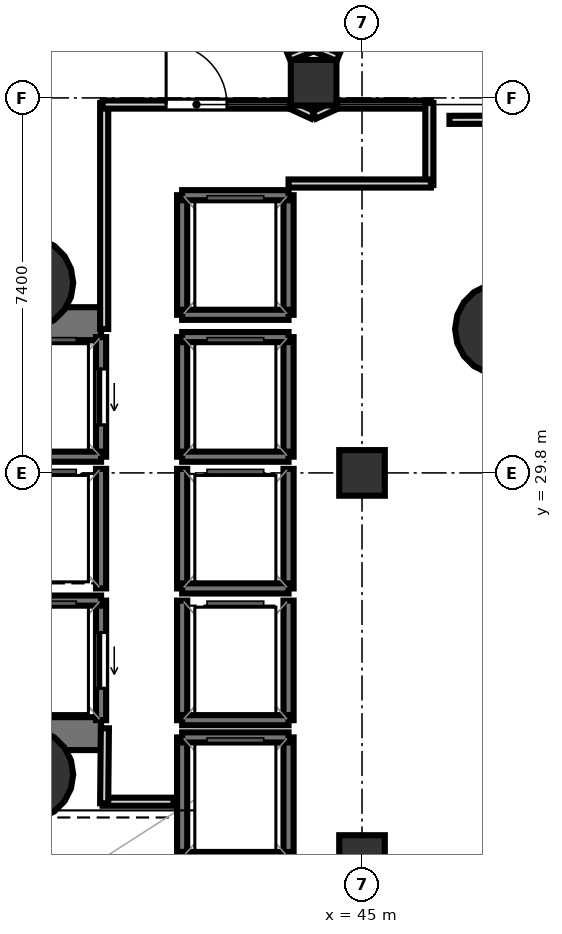
"""IFC4 building model, lengths in metres.
Left out: names, types, materials, properties, quantities, classifications, styles, units other than length and angle.
Written with IfcOpenShell. Run it as: python <this file> out.ifc"""

import sys

from ifc_helpers import new_model, si_unit, direction, frame, frame_2d, origin, origin_2d, place, context, subcontext, project, spatial, rectangle, hollow_circle, extrude, element, fill, save


model = new_model("IFC4")
c1 = context("Model", 3, precision=1e-05, world=origin(), true_north=direction((0.0, 1.0)))
c2 = subcontext(c1, "Body", "Model", "MODEL_VIEW")
j1 = project(units=[si_unit("LENGTHUNIT", "METRE"), si_unit("PLANEANGLEUNIT", "RADIAN")], contexts=[c1])
p1 = place(None, origin())
s1 = spatial("IfcSite", under=j1, at=p1, CompositionType="ELEMENT")
p2 = place(p1, origin())
s2 = spatial("IfcBuilding", under=s1, at=p2, CompositionType="ELEMENT")
p3 = place(p2, frame((0.0, 0.0, 20.6)))
s3 = spatial("IfcBuildingStorey", under=s2, at=p3, CompositionType="ELEMENT", Elevation=20.6)
p4 = place(p3, frame((29.13, 32.745, 0.0), z_axis=(0.0, 0.0, 1.0), x_axis=(1.0, 0.0, 0.0)))
e1 = element("IfcWall", 1, at=p4, inside=s3, PredefinedType="SHEAR", context=c2, shape_type="SweptSolid", body=[
    extrude(rectangle(XDim=10.72, YDim=0.65, at=frame_2d((5.36, 0.0))), origin(), (0.0, 0.0, 1.0), 4.88),
])
p5 = place(p4, frame((1.095, 0.0, 0.0)))
e2 = element("IfcOpeningElement", 2, at=p5, cuts=e1, PredefinedType="OPENING", context=c2, shape_type="SweptSolid", body=[
    extrude(rectangle(XDim=1.25, YDim=2.15, at=frame_2d((0.625, 1.075))), frame((0.0, 0.335, 0.0), z_axis=(0.0, -1.0, 0.0), x_axis=(1.0, 0.0, 0.0)), (0.0, 0.0, 1.0), 0.67),
])
p6 = place(p3, frame((29.13, 24.655, 0.0), z_axis=(0.0, 0.0, 1.0), x_axis=(1.0, 0.0, 0.0)))
e3 = element("IfcWall", 3, at=p6, inside=s3, PredefinedType="SHEAR", context=c2, shape_type="SweptSolid", body=[
    extrude(rectangle(XDim=10.72, YDim=0.65, at=frame_2d((5.36, 0.0))), origin(), (0.0, 0.0, 1.0), 4.88),
])
p7 = place(p6, frame((0.895, 0.0, 0.0)))
e4 = element("IfcOpeningElement", 4, at=p7, cuts=e3, PredefinedType="OPENING", context=c2, shape_type="SweptSolid", body=[
    extrude(rectangle(XDim=1.25, YDim=2.15, at=frame_2d((0.625, 1.075))), frame((0.0, 0.335, 0.0), z_axis=(0.0, -1.0, 0.0), x_axis=(1.0, 0.0, 0.0)), (0.0, 0.0, 1.0), 0.67),
])
for number, where, z_axis, x_axis in (
    (5, (38.4, 33.55, 0.0), (0.0, 0.0, 1.0), (1.0, 0.0, 0.0)),
    (6, (38.4, 23.85, 0.0), (0.0, 0.0, 1.0), (1.0, 0.0, 0.0)),
    (7, (47.736, 32.637, 0.0), (0.0, 0.0, 1.0), (1.0, 0.0, 0.0)),
):
    element("IfcColumn", number, at=place(p3, frame(where, z_axis=z_axis, x_axis=x_axis)), inside=s3, PredefinedType="COLUMN", context=c2, shape_type="SweptSolid", body=[
        extrude(hollow_circle(Radius=0.9, WallThickness=0.045, at=origin_2d()), origin(), (0.0, 0.0, 1.0), 5.1),
    ])
for number, where, z_axis, x_axis in (
    (8, (44.045, 37.5, 0.0), (0.0, 0.0, 1.0), (1.0, 0.0, 0.0)),
    (9, (45.0, 22.2, 0.0), (0.0, 0.0, 1.0), (1.0, 0.0, 0.0)),
    (10, (45.0, 29.8, 0.0), (0.0, 0.0, 1.0), (1.0, 0.0, 0.0)),
):
    element("IfcColumn", number, at=place(p3, frame(where, z_axis=z_axis, x_axis=x_axis)), inside=s3, PredefinedType="COLUMN", context=c2, shape_type="SweptSolid", body=[
        extrude(rectangle(XDim=0.9, YDim=0.9, at=origin_2d()), origin(), (0.0, 0.0, 1.0), 5.1),
    ])
p8 = place(p3, frame((39.85, 30.12, 0.0), z_axis=(0.0, 0.0, 1.0), x_axis=(0.0, 1.0, 0.0)))
e11 = element("IfcWall", 11, at=p8, inside=s3, PredefinedType="SOLIDWALL", context=c2, shape_type="SweptSolid", body=[
    extrude(rectangle(XDim=2.36, YDim=0.2, at=frame_2d((1.18, 0.0))), origin(), (0.0, 0.0, 1.0), 4.88),
])
p9 = place(p8, frame((0.63, 0.0, 0.0)))
e12 = element("IfcOpeningElement", 12, at=p9, cuts=e11, PredefinedType="OPENING", context=c2, shape_type="SweptSolid", body=[
    extrude(rectangle(XDim=1.1, YDim=2.15, at=frame_2d((0.55, 1.075))), frame((0.0, 0.11, 0.0), z_axis=(0.0, -1.0, 0.0), x_axis=(1.0, 0.0, 0.0)), (0.0, 0.0, 1.0), 0.22),
])
p10 = place(p3, frame((37.75, 30.12, 0.0), z_axis=(0.0, 0.0, 1.0), x_axis=(1.0, 0.0, 0.0)))
e13 = element("IfcWall", 13, at=p10, inside=s3, PredefinedType="SOLIDWALL", context=c2, shape_type="SweptSolid", body=[
    extrude(rectangle(XDim=2.1, YDim=0.2, at=frame_2d((1.05, 0.0))), origin(), (0.0, 0.0, 1.0), 4.88),
])
p11 = place(p3, frame((39.85, 24.92, 0.0), z_axis=(0.0, 0.0, 1.0), x_axis=(0.0, 1.0, 0.0)))
e14 = element("IfcWall", 14, at=p11, inside=s3, PredefinedType="SOLIDWALL", context=c2, shape_type="SweptSolid", body=[
    extrude(rectangle(XDim=2.36, YDim=0.2, at=frame_2d((1.18, 0.0))), origin(), (0.0, 0.0, 1.0), 4.88),
])
p12 = place(p11, frame((0.63, 0.0, 0.0)))
e15 = element("IfcOpeningElement", 15, at=p12, cuts=e14, PredefinedType="OPENING", context=c2, shape_type="SweptSolid", body=[
    extrude(rectangle(XDim=1.1, YDim=2.15, at=frame_2d((0.55, 1.075))), frame((0.0, 0.11, 0.0), z_axis=(0.0, -1.0, 0.0), x_axis=(1.0, 0.0, 0.0)), (0.0, 0.0, 1.0), 0.22),
])
p13 = place(p3, frame((37.75, 27.28, 0.0), z_axis=(0.0, 0.0, 1.0), x_axis=(1.0, 0.0, 0.0)))
e16 = element("IfcWall", 16, at=p13, inside=s3, PredefinedType="SOLIDWALL", context=c2, shape_type="SweptSolid", body=[
    extrude(rectangle(XDim=2.1, YDim=0.2, at=frame_2d((1.05, 0.0))), origin(), (0.0, 0.0, 1.0), 4.88),
])
for number, where, z_axis, x_axis in (
    (17, (43.55, 30.12, 0.0), (0.0, 0.0, 1.0), (0.0, 1.0, 0.0)),
    (18, (41.45, 30.12, 0.0), (0.0, 0.0, 1.0), (0.0, 1.0, 0.0)),
):
    element("IfcWall", number, at=place(p3, frame(where, z_axis=z_axis, x_axis=x_axis)), inside=s3, PredefinedType="SOLIDWALL", context=c2, shape_type="SweptSolid", body=[
        extrude(rectangle(XDim=2.36, YDim=0.2, at=frame_2d((1.18, 0.0))), origin(), (0.0, 0.0, 1.0), 4.88),
    ])
for number, where, z_axis, x_axis in (
    (19, (41.45, 32.48, 0.0), (0.0, 0.0, 1.0), (1.0, 0.0, 0.0)),
    (20, (41.45, 30.12, 0.0), (0.0, 0.0, 1.0), (1.0, 0.0, 0.0)),
):
    element("IfcWall", number, at=place(p3, frame(where, z_axis=z_axis, x_axis=x_axis)), inside=s3, PredefinedType="SOLIDWALL", context=c2, shape_type="SweptSolid", body=[
        extrude(rectangle(XDim=2.1, YDim=0.2, at=frame_2d((1.05, 0.0))), origin(), (0.0, 0.0, 1.0), 4.88),
    ])
for number, where, z_axis, x_axis in (
    (21, (43.55, 27.52, 0.0), (0.0, 0.0, 1.0), (0.0, 1.0, 0.0)),
    (22, (41.45, 27.52, 0.0), (0.0, 0.0, 1.0), (0.0, 1.0, 0.0)),
):
    element("IfcWall", number, at=place(p3, frame(where, z_axis=z_axis, x_axis=x_axis)), inside=s3, PredefinedType="SOLIDWALL", context=c2, shape_type="SweptSolid", body=[
        extrude(rectangle(XDim=2.36, YDim=0.2, at=frame_2d((1.18, 0.0))), origin(), (0.0, 0.0, 1.0), 4.88),
    ])
p14 = place(p3, frame((41.45, 27.52, 0.0), z_axis=(0.0, 0.0, 1.0), x_axis=(1.0, 0.0, 0.0)))
e23 = element("IfcWall", 23, at=p14, inside=s3, PredefinedType="SOLIDWALL", context=c2, shape_type="SweptSolid", body=[
    extrude(rectangle(XDim=2.1, YDim=0.2, at=frame_2d((1.05, 0.0))), origin(), (0.0, 0.0, 1.0), 4.88),
])
for number, where, z_axis, x_axis in (
    (24, (43.55, 24.92, 0.0), (0.0, 0.0, 1.0), (0.0, 1.0, 0.0)),
    (25, (41.45, 24.92, 0.0), (0.0, 0.0, 1.0), (0.0, 1.0, 0.0)),
):
    element("IfcWall", number, at=place(p3, frame(where, z_axis=z_axis, x_axis=x_axis)), inside=s3, PredefinedType="SOLIDWALL", context=c2, shape_type="SweptSolid", body=[
        extrude(rectangle(XDim=2.36, YDim=0.2, at=frame_2d((1.18, 0.0))), origin(), (0.0, 0.0, 1.0), 4.88),
    ])
p15 = place(p3, frame((41.45, 24.92, 0.0), z_axis=(0.0, 0.0, 1.0), x_axis=(1.0, 0.0, 0.0)))
e26 = element("IfcWall", 26, at=p15, inside=s3, PredefinedType="SOLIDWALL", context=c2, shape_type="SweptSolid", body=[
    extrude(rectangle(XDim=2.1, YDim=0.2, at=frame_2d((1.05, 0.0))), origin(), (0.0, 0.0, 1.0), 4.88),
])
p16 = place(p3, frame((39.85, 27.52, 0.0), z_axis=(0.0, 0.0, 1.0), x_axis=(0.0, 1.0, 0.0)))
e27 = element("IfcWall", 27, at=p16, inside=s3, PredefinedType="SOLIDWALL", context=c2, shape_type="SweptSolid", body=[
    extrude(rectangle(XDim=2.36, YDim=0.2, at=frame_2d((1.18, 0.0))), origin(), (0.0, 0.0, 1.0), 4.88),
])
for number, where, z_axis, x_axis in (
    (28, (43.55, 22.22, 0.0), (0.0, 0.0, 1.0), (0.0, 1.0, 0.0)),
    (29, (41.45, 22.22, 0.0), (0.0, 0.0, 1.0), (0.0, 1.0, 0.0)),
):
    element("IfcWall", number, at=place(p3, frame(where, z_axis=z_axis, x_axis=x_axis)), inside=s3, PredefinedType="SOLIDWALL", context=c2, shape_type="SweptSolid", body=[
        extrude(rectangle(XDim=2.36, YDim=0.2, at=frame_2d((1.18, 0.0))), origin(), (0.0, 0.0, 1.0), 4.88),
    ])
for number, where, z_axis, x_axis in (
    (30, (41.45, 24.58, 0.0), (0.0, 0.0, 1.0), (1.0, 0.0, 0.0)),
    (31, (41.45, 22.22, 0.0), (0.0, 0.0, 1.0), (1.0, 0.0, 0.0)),
):
    element("IfcWall", number, at=place(p3, frame(where, z_axis=z_axis, x_axis=x_axis)), inside=s3, PredefinedType="SOLIDWALL", context=c2, shape_type="SweptSolid", body=[
        extrude(rectangle(XDim=2.1, YDim=0.2, at=frame_2d((1.05, 0.0))), origin(), (0.0, 0.0, 1.0), 4.88),
    ])
for number, where, z_axis, x_axis in (
    (32, (43.55, 32.92, 0.0), (0.0, 0.0, 1.0), (0.0, 1.0, 0.0)),
    (33, (41.45, 32.92, 0.0), (0.0, 0.0, 1.0), (0.0, 1.0, 0.0)),
):
    element("IfcWall", number, at=place(p3, frame(where, z_axis=z_axis, x_axis=x_axis)), inside=s3, PredefinedType="SOLIDWALL", context=c2, shape_type="SweptSolid", body=[
        extrude(rectangle(XDim=2.36, YDim=0.2, at=frame_2d((1.18, 0.0))), origin(), (0.0, 0.0, 1.0), 4.88),
    ])
for number, where, z_axis, x_axis in (
    (34, (41.45, 35.28, 0.0), (0.0, 0.0, 1.0), (1.0, 0.0, 0.0)),
    (35, (41.45, 32.92, 0.0), (0.0, 0.0, 1.0), (1.0, 0.0, 0.0)),
):
    element("IfcWall", number, at=place(p3, frame(where, z_axis=z_axis, x_axis=x_axis)), inside=s3, PredefinedType="SOLIDWALL", context=c2, shape_type="SweptSolid", body=[
        extrude(rectangle(XDim=2.1, YDim=0.2, at=frame_2d((1.05, 0.0))), origin(), (0.0, 0.0, 1.0), 4.88),
    ])
p17 = place(p3, frame((39.911, 32.64, 0.0), z_axis=(0.0, 0.0, 1.0), x_axis=(0.0, 1.0, 0.0)))
e36 = element("IfcWall", 36, at=p17, inside=s3, PredefinedType="PARTITIONING", context=c2, shape_type="SweptSolid", body=[
    extrude(rectangle(XDim=4.46, YDim=0.16, at=frame_2d((2.23, 0.0))), origin(), (0.0, 0.0, 1.0), 3.4),
])
p18 = place(p3, frame((39.88, 37.069, 0.0), z_axis=(0.0, 0.0, 1.0), x_axis=(1.0, 0.0, 0.0)))
e37 = element("IfcWall", 37, at=p18, inside=s3, PredefinedType="PARTITIONING", context=c2, shape_type="SweptSolid", body=[
    extrude(rectangle(XDim=3.708, YDim=0.16, at=frame_2d((1.854, 0.0))), origin(), (0.0, 0.0, 1.0), 3.378),
])
p19 = place(p18, frame((1.254, 0.0, 0.0)))
e38 = element("IfcOpeningElement", 38, at=p19, cuts=e37, PredefinedType="OPENING", context=c2, shape_type="SweptSolid", body=[
    extrude(rectangle(XDim=1.2, YDim=2.15, at=frame_2d((0.6, 1.075))), frame((0.0, 0.09, 0.0), z_axis=(0.0, -1.0, 0.0), x_axis=(1.0, 0.0, 0.0)), (0.0, 0.0, 1.0), 0.18),
])
p20 = place(p3, frame((43.575, 37.072, 0.0), z_axis=(0.0, 0.0, 1.0), x_axis=(0.908696751383, -0.417456840913, 0.0)))
e39 = element("IfcWall", 39, at=p20, inside=s3, PredefinedType="PARTITIONING", context=c2, shape_type="SweptSolid", body=[
    extrude(rectangle(XDim=0.503, YDim=0.16, at=frame_2d((0.251, 0.0))), origin(), (0.0, 0.0, 1.0), 3.378),
])
p21 = place(p3, frame((44.058, 36.862, 0.0), z_axis=(0.0, 0.0, 1.0), x_axis=(0.908696751383, 0.417456840913, 0.0)))
e40 = element("IfcWall", 40, at=p21, inside=s3, PredefinedType="PARTITIONING", context=c2, shape_type="SweptSolid", body=[
    extrude(rectangle(XDim=0.503, YDim=0.16, at=frame_2d((0.251, 0.0))), origin(), (0.0, 0.0, 1.0), 3.4),
])
p22 = place(p3, frame((44.502, 37.069, 0.0), z_axis=(0.0, 0.0, 1.0), x_axis=(1.0, 0.0, 0.0)))
e41 = element("IfcWall", 41, at=p22, inside=s3, PredefinedType="PARTITIONING", context=c2, shape_type="SweptSolid", body=[
    extrude(rectangle(XDim=1.858, YDim=0.16, at=frame_2d((0.929, 0.0))), origin(), (0.0, 0.0, 1.0), 3.4),
])
p23 = place(p3, frame((46.329, 37.1, 0.0), z_axis=(0.0, 0.0, 1.0), x_axis=(0.0, -1.0, 0.0)))
e42 = element("IfcWall", 42, at=p23, inside=s3, PredefinedType="PARTITIONING", context=c2, shape_type="SweptSolid", body=[
    extrude(rectangle(XDim=1.62, YDim=0.16, at=frame_2d((0.81, 0.0))), origin(), (0.0, 0.0, 1.0), 3.4),
])
p24 = place(p3, frame((46.36, 35.511, 0.0), z_axis=(0.0, 0.0, 1.0), x_axis=(-1.0, 0.0, 0.0)))
e43 = element("IfcWall", 43, at=p24, inside=s3, PredefinedType="PARTITIONING", context=c2, shape_type="SweptSolid", body=[
    extrude(rectangle(XDim=2.81, YDim=0.16, at=frame_2d((1.405, 0.0))), origin(), (0.0, 0.0, 1.0), 3.378),
])
p25 = place(p3, frame((41.28, 23.311, 0.0), z_axis=(0.0, 0.0, 1.0), x_axis=(-1.0, 0.0, 0.0)))
e44 = element("IfcWall", 44, at=p25, inside=s3, PredefinedType="PARTITIONING", context=c2, shape_type="SweptSolid", body=[
    extrude(rectangle(XDim=1.4, YDim=0.16, at=frame_2d((0.7, 0.0))), origin(), (0.0, 0.0, 1.0), 3.4),
])
p26 = place(p3, frame((39.911, 23.28, 0.0), z_axis=(0.0, 0.0, 1.0), x_axis=(0.009397771291, 0.999955839972, 0.0)))
e45 = element("IfcWall", 45, at=p26, inside=s3, PredefinedType="PARTITIONING", context=c2, shape_type="SweptSolid", body=[
    extrude(rectangle(XDim=1.481, YDim=0.16, at=frame_2d((0.74, 0.0))), origin(), (0.0, 0.0, 1.0), 3.4),
])
p27 = place(p3, frame((55.65, 36.789, 0.0), z_axis=(0.0, 0.0, 1.0), x_axis=(-0.999996901459, -0.002489391821, 0.0)))
e46 = element("IfcWall", 46, at=p27, inside=s3, PredefinedType="PARTITIONING", context=c2, shape_type="SweptSolid", body=[
    extrude(rectangle(XDim=8.925, YDim=0.16, at=frame_2d((4.462, 0.0))), origin(), (0.0, 0.0, 1.0), 3.4),
])
p28 = place(p3, frame((44.53, 38.002, 0.0), z_axis=(0.0, 0.0, 1.0), x_axis=(-0.924045828763, 0.382281710714, 0.0)))
e47 = element("IfcWall", 47, at=p28, inside=s3, PredefinedType="PARTITIONING", context=c2, shape_type="SweptSolid", body=[
    extrude(rectangle(XDim=0.513, YDim=0.16, at=frame_2d((0.256, 0.0))), origin(), (0.0, 0.0, 1.0), 3.4),
])
p29 = place(p3, frame((44.033, 38.198, 0.0), z_axis=(0.0, 0.0, 1.0), x_axis=(-0.923976210744, -0.382449947024, 0.0)))
e48 = element("IfcWall", 48, at=p29, inside=s3, PredefinedType="PARTITIONING", context=c2, shape_type="SweptSolid", body=[
    extrude(rectangle(XDim=0.513, YDim=0.16, at=frame_2d((0.256, 0.0))), origin(), (0.0, 0.0, 1.0), 3.4),
])
p30 = place(p9, origin())
e49 = element("IfcDoor", 49, at=p30, inside=s3, OperationType="SLIDING_TO_LEFT", PredefinedType="DOOR", context=c2, shape_type="SweptSolid", body=[
    extrude(rectangle(XDim=1.1, YDim=2.15, at=frame_2d((0.55, 1.075))), frame((0.0, 0.025, 0.0), z_axis=(0.0, -1.0, 0.0), x_axis=(1.0, 0.0, 0.0)), (0.0, 0.0, 1.0), 0.05),
])
fill(e12, e49)
p31 = place(p12, origin())
e50 = element("IfcDoor", 50, at=p31, inside=s3, OperationType="SLIDING_TO_LEFT", PredefinedType="DOOR", context=c2, shape_type="SweptSolid", body=[
    extrude(rectangle(XDim=1.1, YDim=2.15, at=frame_2d((0.55, 1.075))), frame((0.0, 0.025, 0.0), z_axis=(0.0, -1.0, 0.0), x_axis=(1.0, 0.0, 0.0)), (0.0, 0.0, 1.0), 0.05),
])
fill(e15, e50)
p32 = place(p19, origin())
e51 = element("IfcDoor", 51, at=p32, inside=s3, OperationType="SINGLE_SWING_LEFT", PredefinedType="DOOR", context=c2, shape_type="SweptSolid", body=[
    extrude(rectangle(XDim=1.2, YDim=2.15, at=frame_2d((0.6, 1.075))), frame((0.0, 0.025, 0.0), z_axis=(0.0, -1.0, 0.0), x_axis=(1.0, 0.0, 0.0)), (0.0, 0.0, 1.0), 0.05),
])
fill(e38, e51)
save(model, sys.argv[1])
